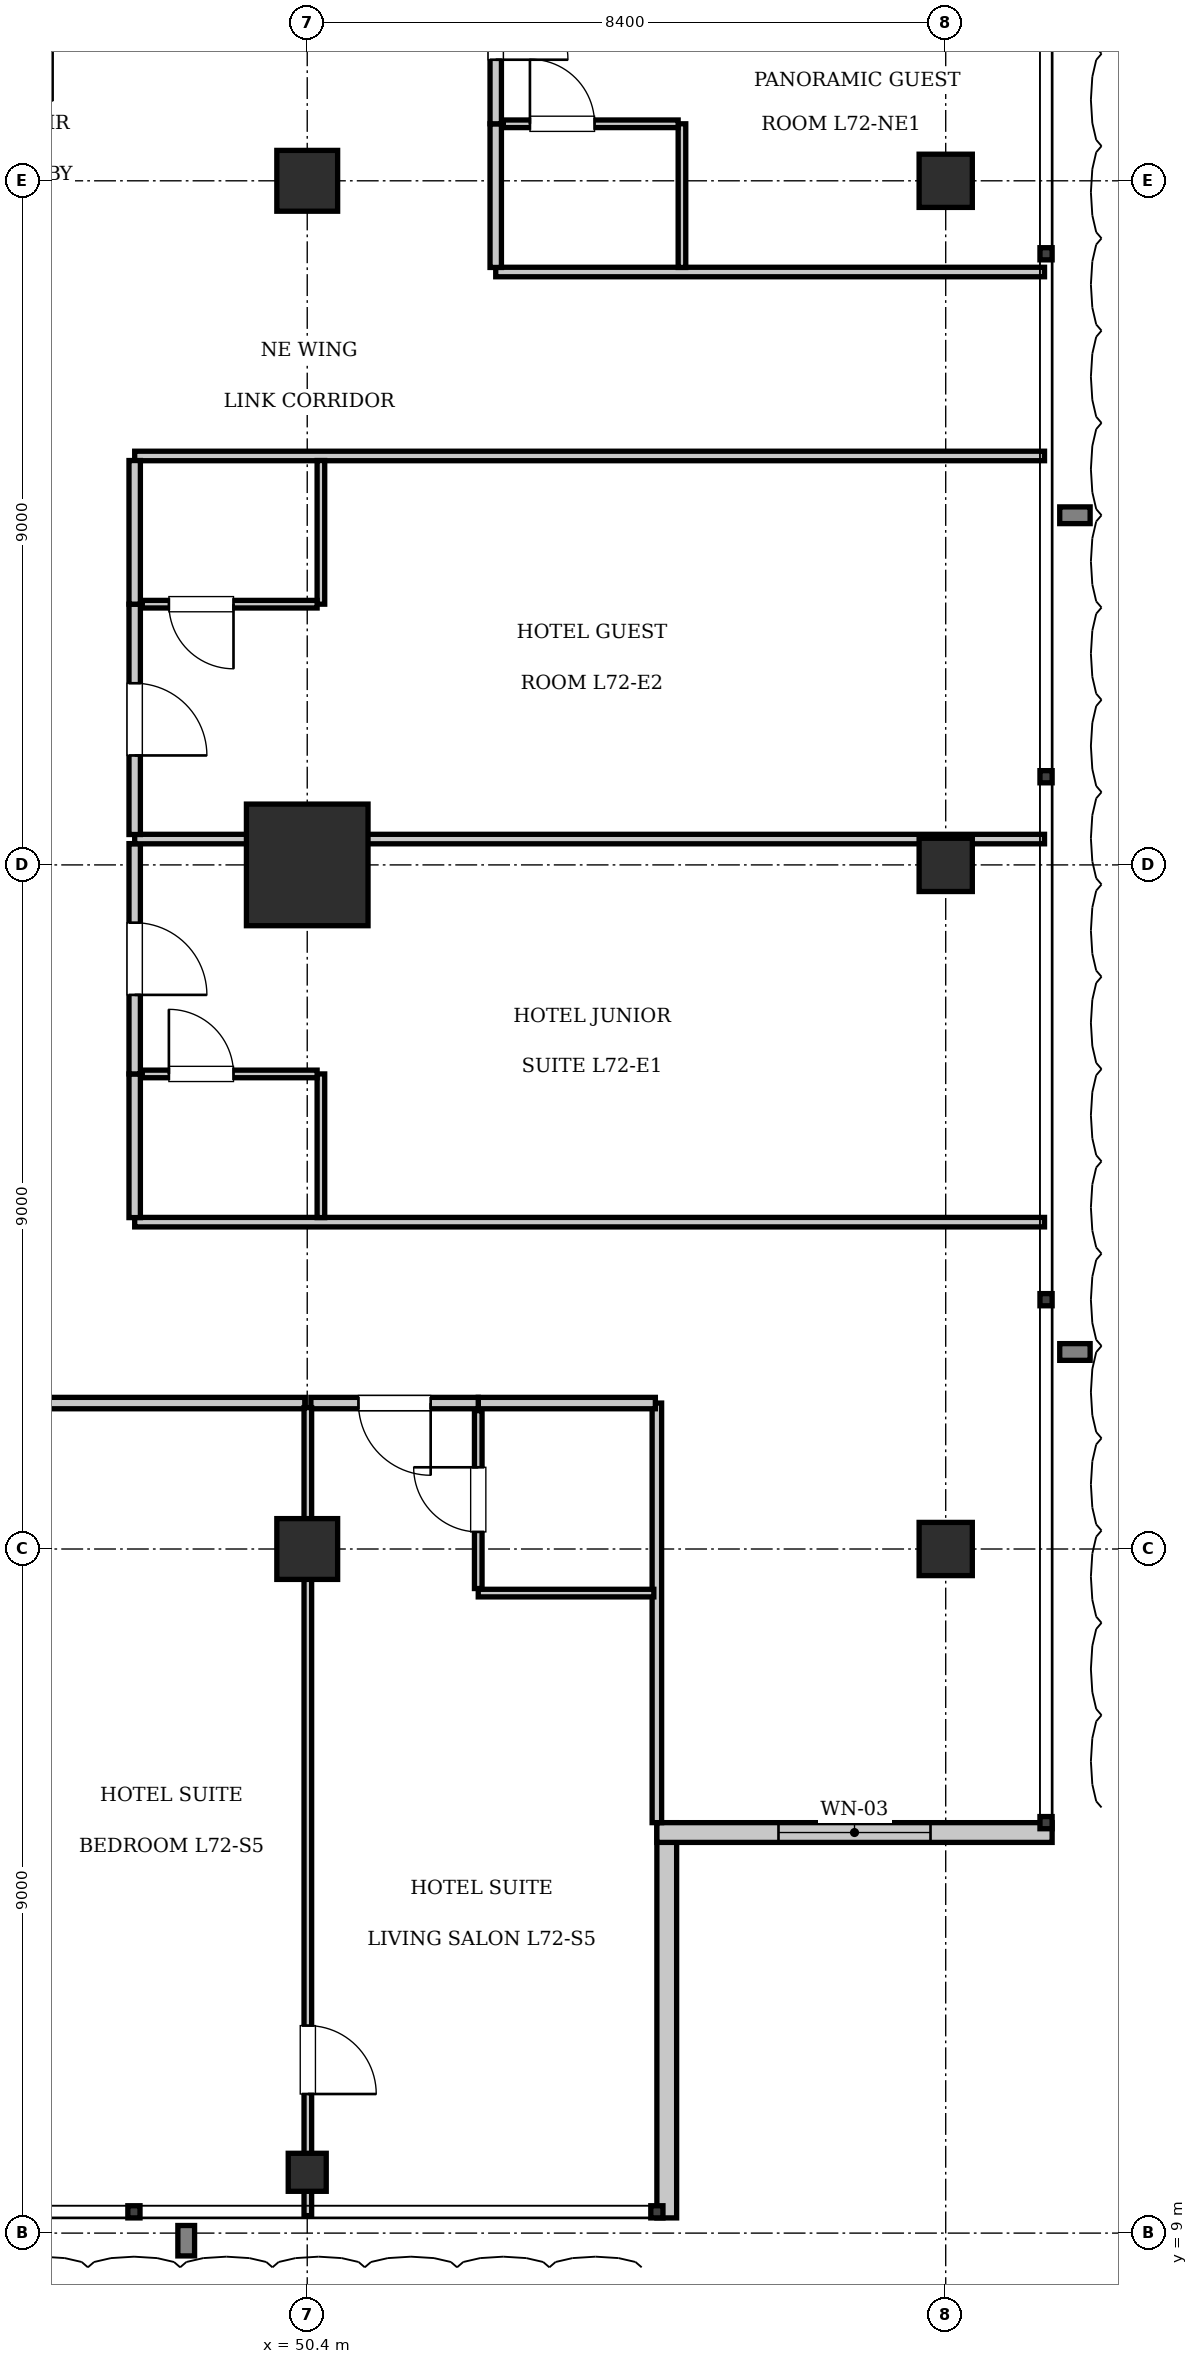
"""IFC4 building model, lengths in metres.
Left out: names, types, materials, properties, quantities, classifications, styles, units other than length and angle.
Written with IfcOpenShell. Run it as: python <this file> out.ifc"""

import sys

from ifc_helpers import new_model, si_unit, direction, frame, frame_2d, origin, origin_2d, place, context, subcontext, project, spatial, rectangle, i_section, extrude, element, fill, save


model = new_model("IFC4")
c1 = context("Model", 3, precision=1e-05, world=origin(), true_north=direction((0.0, 1.0)))
c2 = subcontext(c1, "Body", "Model", "MODEL_VIEW")
j1 = project(units=[si_unit("LENGTHUNIT", "METRE"), si_unit("PLANEANGLEUNIT", "RADIAN")], contexts=[c1])
p1 = place(None, origin())
s1 = spatial("IfcSite", under=j1, at=p1, CompositionType="ELEMENT")
p2 = place(p1, origin())
s2 = spatial("IfcBuilding", under=s1, at=p2, CompositionType="ELEMENT")
p3 = place(p2, frame((0.0, 0.0, 293.3)))
s3 = spatial("IfcBuildingStorey", under=s2, at=p3, CompositionType="ELEMENT", Elevation=293.3)
p4 = place(p3, frame((50.4, 27.0, 0.0), z_axis=(0.0, 0.0, 1.0), x_axis=(1.0, 0.0, 0.0)))
e1 = element("IfcColumn", 1, at=p4, inside=s3, PredefinedType="COLUMN", context=c2, shape_type="SweptSolid", body=[
    extrude(rectangle(XDim=1.6, YDim=1.6, at=origin_2d()), origin(), (0.0, 0.0, 1.0), 3.85),
])
for number, where, z_axis, x_axis in (
    (2, (50.4, 36.0, 0.0), (0.0, 0.0, 1.0), (1.0, 0.0, 0.0)),
    (3, (50.4, 18.0, 0.0), (0.0, 0.0, 1.0), (1.0, 0.0, 0.0)),
):
    element("IfcColumn", number, at=place(p3, frame(where, z_axis=z_axis, x_axis=x_axis)), inside=s3, PredefinedType="COLUMN", context=c2, shape_type="SweptSolid", body=[
        extrude(rectangle(XDim=0.8, YDim=0.8, at=origin_2d()), origin(), (0.0, 0.0, 1.0), 3.85),
    ])
for number, where, z_axis, x_axis in (
    (4, (58.8, 18.0, 0.0), (0.0, 0.0, 1.0), (1.0, 0.0, 0.0)),
    (5, (58.8, 27.0, 0.0), (0.0, 0.0, 1.0), (1.0, 0.0, 0.0)),
    (6, (58.8, 36.0, 0.0), (0.0, 0.0, 1.0), (1.0, 0.0, 0.0)),
):
    element("IfcColumn", number, at=place(p3, frame(where, z_axis=z_axis, x_axis=x_axis)), inside=s3, PredefinedType="COLUMN", context=c2, shape_type="SweptSolid", body=[
        extrude(rectangle(XDim=0.7, YDim=0.7, at=origin_2d()), origin(), (0.0, 0.0, 1.0), 3.85),
    ])
p5 = place(p3, frame((50.4, 9.8, 0.0), z_axis=(0.0, 0.0, 1.0), x_axis=(1.0, 0.0, 0.0)))
e7 = element("IfcColumn", 7, at=p5, inside=s3, PredefinedType="COLUMN", context=c2, shape_type="SweptSolid", body=[
    extrude(i_section(OverallWidth=0.5, OverallDepth=0.5, WebThickness=0.022, FlangeThickness=0.032, at=origin_2d()), origin(), (0.0, 0.0, 1.0), 3.85),
])
p6 = place(p3, frame((55.13, 14.4, 0.0), z_axis=(0.0, 0.0, 1.0), x_axis=(0.0, -1.0, 0.0)))
e8 = element("IfcWall", 8, at=p6, inside=s3, PredefinedType="SOLIDWALL", context=c2, shape_type="SweptSolid", body=[
    extrude(rectangle(XDim=5.2, YDim=0.26, at=frame_2d((2.6, 0.0))), origin(), (0.0, 0.0, 1.0), 3.61),
])
p7 = place(p3, frame((60.2, 14.27, 0.0), z_axis=(0.0, 0.0, 1.0), x_axis=(-1.0, 0.0, 0.0)))
e9 = element("IfcWall", 9, at=p7, inside=s3, PredefinedType="SOLIDWALL", context=c2, shape_type="SweptSolid", body=[
    extrude(rectangle(XDim=5.2, YDim=0.26, at=frame_2d((2.6, 0.0))), origin(), (0.0, 0.0, 1.0), 3.61),
])
p8 = place(p7, frame((1.6, 0.0, 0.9)))
e10 = element("IfcOpeningElement", 10, at=p8, cuts=e9, PredefinedType="OPENING", context=c2, shape_type="SweptSolid", body=[
    extrude(rectangle(XDim=2.0, YDim=2.2, at=frame_2d((1.0, 1.1))), frame((0.0, 0.14, 0.0), z_axis=(0.0, -1.0, 0.0), x_axis=(1.0, 0.0, 0.0)), (0.0, 0.0, 1.0), 0.28),
])
p9 = place(p3, frame((55.0, 14.4, 0.0), z_axis=(0.0, 0.0, 1.0), x_axis=(0.0, 1.0, 0.0)))
e11 = element("IfcWall", 11, at=p9, inside=s3, PredefinedType="PARTITIONING", context=c2, shape_type="SweptSolid", body=[
    extrude(rectangle(XDim=5.52, YDim=0.125, at=frame_2d((2.76, 0.0))), origin(), (0.0, 0.0, 1.0), 3.61),
])
p10 = place(p3, frame((52.65, 19.92, 0.0), z_axis=(0.0, 0.0, 1.0), x_axis=(1.0, 0.0, 0.0)))
e12 = element("IfcWall", 12, at=p10, inside=s3, PredefinedType="PARTITIONING", context=c2, shape_type="SweptSolid", body=[
    extrude(rectangle(XDim=2.33, YDim=0.15, at=frame_2d((1.165, 0.0))), origin(), (0.0, 0.0, 1.0), 3.61),
])
p11 = place(p3, frame((52.65, 17.42, 0.0), z_axis=(0.0, 0.0, 1.0), x_axis=(1.0, 0.0, 0.0)))
e13 = element("IfcWall", 13, at=p11, inside=s3, PredefinedType="PARTITIONING", context=c2, shape_type="SweptSolid", body=[
    extrude(rectangle(XDim=2.31, YDim=0.1, at=frame_2d((1.155, 0.0))), origin(), (0.0, 0.0, 1.0), 3.61),
])
p12 = place(p3, frame((52.65, 17.48, 0.0), z_axis=(0.0, 0.0, 1.0), x_axis=(0.0, 1.0, 0.0)))
e14 = element("IfcWall", 14, at=p12, inside=s3, PredefinedType="PARTITIONING", context=c2, shape_type="SweptSolid", body=[
    extrude(rectangle(XDim=2.34, YDim=0.1, at=frame_2d((1.17, 0.0))), origin(), (0.0, 0.0, 1.0), 3.61),
])
p13 = place(p12, frame((0.745, 0.0, 0.0)))
e15 = element("IfcOpeningElement", 15, at=p13, cuts=e14, PredefinedType="OPENING", context=c2, shape_type="SweptSolid", body=[
    extrude(rectangle(XDim=0.85, YDim=2.1, at=frame_2d((0.425, 1.05))), frame((0.0, 0.06, 0.0), z_axis=(0.0, -1.0, 0.0), x_axis=(1.0, 0.0, 0.0)), (0.0, 0.0, 1.0), 0.12),
])
p14 = place(p3, frame((46.82, 19.92, 0.0), z_axis=(0.0, 0.0, 1.0), x_axis=(1.0, 0.0, 0.0)))
e16 = element("IfcWall", 16, at=p14, inside=s3, PredefinedType="PARTITIONING", context=c2, shape_type="SweptSolid", body=[
    extrude(rectangle(XDim=3.548, YDim=0.15, at=frame_2d((1.774, 0.0))), origin(), (0.0, 0.0, 1.0), 3.61),
])
p15 = place(p3, frame((50.448, 19.92, 0.0), z_axis=(0.0, 0.0, 1.0), x_axis=(1.0, 0.0, 0.0)))
e17 = element("IfcWall", 17, at=p15, inside=s3, PredefinedType="PARTITIONING", context=c2, shape_type="SweptSolid", body=[
    extrude(rectangle(XDim=2.202, YDim=0.15, at=frame_2d((1.101, 0.0))), origin(), (0.0, 0.0, 1.0), 3.61),
])
p16 = place(p15, frame((0.626, 0.0, 0.0)))
e18 = element("IfcOpeningElement", 18, at=p16, cuts=e17, PredefinedType="OPENING", context=c2, shape_type="SweptSolid", body=[
    extrude(rectangle(XDim=0.95, YDim=2.15, at=frame_2d((0.475, 1.075))), frame((0.0, 0.085, 0.0), z_axis=(0.0, -1.0, 0.0), x_axis=(1.0, 0.0, 0.0)), (0.0, 0.0, 1.0), 0.17),
])
p17 = place(p3, frame((50.408, 9.23, 0.0), z_axis=(0.0, 0.0, 1.0), x_axis=(0.0, 1.0, 0.0)))
e19 = element("IfcWall", 19, at=p17, inside=s3, PredefinedType="PARTITIONING", context=c2, shape_type="SweptSolid", body=[
    extrude(rectangle(XDim=10.63, YDim=0.1, at=frame_2d((5.315, 0.0))), origin(), (0.0, 0.0, 1.0), 3.081),
])
p18 = place(p17, frame((1.6, 0.0, 0.0)))
e20 = element("IfcOpeningElement", 20, at=p18, cuts=e19, PredefinedType="OPENING", context=c2, shape_type="SweptSolid", body=[
    extrude(rectangle(XDim=0.9, YDim=2.1, at=frame_2d((0.45, 1.05))), frame((0.0, 0.06, 0.0), z_axis=(0.0, -1.0, 0.0), x_axis=(1.0, 0.0, 0.0)), (0.0, 0.0, 1.0), 0.12),
])
for number, where, z_axis, x_axis in (
    (21, (48.13, 22.3, 0.0), (0.0, 0.0, 1.0), (1.0, 0.0, 0.0)),
    (22, (48.13, 32.38, 0.0), (0.0, 0.0, 1.0), (1.0, 0.0, 0.0)),
):
    element("IfcWall", number, at=place(p3, frame(where, z_axis=z_axis, x_axis=x_axis)), inside=s3, PredefinedType="PARTITIONING", context=c2, shape_type="SweptSolid", body=[
        extrude(rectangle(XDim=11.97, YDim=0.125, at=frame_2d((5.985, 0.0))), origin(), (0.0, 0.0, 1.0), 3.61),
    ])
p19 = place(p3, frame((48.13, 22.36, 0.0), z_axis=(0.0, 0.0, 1.0), x_axis=(0.0, 1.0, 0.0)))
e23 = element("IfcWall", 23, at=p19, inside=s3, PredefinedType="PARTITIONING", context=c2, shape_type="SweptSolid", body=[
    extrude(rectangle(XDim=1.89, YDim=0.15, at=frame_2d((0.945, 0.0))), origin(), (0.0, 0.0, 1.0), 3.61),
])
p20 = place(p3, frame((48.13, 24.25, 0.0), z_axis=(0.0, 0.0, 1.0), x_axis=(0.0, 1.0, 0.0)))
e24 = element("IfcWall", 24, at=p20, inside=s3, PredefinedType="PARTITIONING", context=c2, shape_type="SweptSolid", body=[
    extrude(rectangle(XDim=3.03, YDim=0.15, at=frame_2d((1.515, 0.0))), origin(), (0.0, 0.0, 1.0), 3.61),
])
p21 = place(p20, frame((1.04, 0.0, 0.0)))
e25 = element("IfcOpeningElement", 25, at=p21, cuts=e24, PredefinedType="OPENING", context=c2, shape_type="SweptSolid", body=[
    extrude(rectangle(XDim=0.95, YDim=2.15, at=frame_2d((0.475, 1.075))), frame((0.0, 0.085, 0.0), z_axis=(0.0, -1.0, 0.0), x_axis=(1.0, 0.0, 0.0)), (0.0, 0.0, 1.0), 0.17),
])
p22 = place(p3, frame((50.58, 22.36, 0.0), z_axis=(0.0, 0.0, 1.0), x_axis=(0.0, 1.0, 0.0)))
e26 = element("IfcWall", 26, at=p22, inside=s3, PredefinedType="PARTITIONING", context=c2, shape_type="SweptSolid", body=[
    extrude(rectangle(XDim=1.89, YDim=0.1, at=frame_2d((0.945, 0.0))), origin(), (0.0, 0.0, 1.0), 3.61),
])
p23 = place(p3, frame((48.23, 24.25, 0.0), z_axis=(0.0, 0.0, 1.0), x_axis=(1.0, 0.0, 0.0)))
e27 = element("IfcWall", 27, at=p23, inside=s3, PredefinedType="PARTITIONING", context=c2, shape_type="SweptSolid", body=[
    extrude(rectangle(XDim=2.3, YDim=0.1, at=frame_2d((1.15, 0.0))), origin(), (0.0, 0.0, 1.0), 3.61),
])
p24 = place(p23, frame((0.35, 0.0, 0.0)))
e28 = element("IfcOpeningElement", 28, at=p24, cuts=e27, PredefinedType="OPENING", context=c2, shape_type="SweptSolid", body=[
    extrude(rectangle(XDim=0.85, YDim=2.1, at=frame_2d((0.425, 1.05))), frame((0.0, 0.06, 0.0), z_axis=(0.0, -1.0, 0.0), x_axis=(1.0, 0.0, 0.0)), (0.0, 0.0, 1.0), 0.12),
])
p25 = place(p3, frame((48.13, 27.34, 0.0), z_axis=(0.0, 0.0, 1.0), x_axis=(1.0, 0.0, 0.0)))
e29 = element("IfcWall", 29, at=p25, inside=s3, PredefinedType="PARTITIONING", context=c2, shape_type="SweptSolid", body=[
    extrude(rectangle(XDim=11.97, YDim=0.125, at=frame_2d((5.985, 0.0))), origin(), (0.0, 0.0, 1.0), 3.61),
])
p26 = place(p3, frame((48.13, 27.4, 0.0), z_axis=(0.0, 0.0, 1.0), x_axis=(0.0, 1.0, 0.0)))
e30 = element("IfcWall", 30, at=p26, inside=s3, PredefinedType="PARTITIONING", context=c2, shape_type="SweptSolid", body=[
    extrude(rectangle(XDim=3.03, YDim=0.15, at=frame_2d((1.515, 0.0))), origin(), (0.0, 0.0, 1.0), 3.61),
])
p27 = place(p26, frame((1.04, 0.0, 0.0)))
e31 = element("IfcOpeningElement", 31, at=p27, cuts=e30, PredefinedType="OPENING", context=c2, shape_type="SweptSolid", body=[
    extrude(rectangle(XDim=0.95, YDim=2.15, at=frame_2d((0.475, 1.075))), frame((0.0, 0.085, 0.0), z_axis=(0.0, -1.0, 0.0), x_axis=(1.0, 0.0, 0.0)), (0.0, 0.0, 1.0), 0.17),
])
p28 = place(p3, frame((48.13, 30.43, 0.0), z_axis=(0.0, 0.0, 1.0), x_axis=(0.0, 1.0, 0.0)))
e32 = element("IfcWall", 32, at=p28, inside=s3, PredefinedType="PARTITIONING", context=c2, shape_type="SweptSolid", body=[
    extrude(rectangle(XDim=1.89, YDim=0.15, at=frame_2d((0.945, 0.0))), origin(), (0.0, 0.0, 1.0), 3.61),
])
p29 = place(p3, frame((50.58, 30.43, 0.0), z_axis=(0.0, 0.0, 1.0), x_axis=(0.0, 1.0, 0.0)))
e33 = element("IfcWall", 33, at=p29, inside=s3, PredefinedType="PARTITIONING", context=c2, shape_type="SweptSolid", body=[
    extrude(rectangle(XDim=1.89, YDim=0.1, at=frame_2d((0.945, 0.0))), origin(), (0.0, 0.0, 1.0), 3.61),
])
p30 = place(p3, frame((48.23, 30.43, 0.0), z_axis=(0.0, 0.0, 1.0), x_axis=(1.0, 0.0, 0.0)))
e34 = element("IfcWall", 34, at=p30, inside=s3, PredefinedType="PARTITIONING", context=c2, shape_type="SweptSolid", body=[
    extrude(rectangle(XDim=2.3, YDim=0.1, at=frame_2d((1.15, 0.0))), origin(), (0.0, 0.0, 1.0), 3.61),
])
p31 = place(p30, frame((0.35, 0.0, 0.0)))
e35 = element("IfcOpeningElement", 35, at=p31, cuts=e34, PredefinedType="OPENING", context=c2, shape_type="SweptSolid", body=[
    extrude(rectangle(XDim=0.85, YDim=2.1, at=frame_2d((0.425, 1.05))), frame((0.0, 0.06, 0.0), z_axis=(0.0, -1.0, 0.0), x_axis=(1.0, 0.0, 0.0)), (0.0, 0.0, 1.0), 0.12),
])
p32 = place(p3, frame((52.88, 34.8, 0.0), z_axis=(0.0, 0.0, 1.0), x_axis=(1.0, 0.0, 0.0)))
e36 = element("IfcWall", 36, at=p32, inside=s3, PredefinedType="PARTITIONING", context=c2, shape_type="SweptSolid", body=[
    extrude(rectangle(XDim=7.22, YDim=0.125, at=frame_2d((3.61, 0.0))), origin(), (0.0, 0.0, 1.0), 3.61),
])
p33 = place(p3, frame((52.88, 34.86, 0.0), z_axis=(0.0, 0.0, 1.0), x_axis=(0.0, 1.0, 0.0)))
e37 = element("IfcWall", 37, at=p33, inside=s3, PredefinedType="PARTITIONING", context=c2, shape_type="SweptSolid", body=[
    extrude(rectangle(XDim=1.89, YDim=0.15, at=frame_2d((0.945, 0.0))), origin(), (0.0, 0.0, 1.0), 3.61),
])
p34 = place(p3, frame((52.88, 36.75, 0.0), z_axis=(0.0, 0.0, 1.0), x_axis=(0.0, 1.0, 0.0)))
e38 = element("IfcWall", 38, at=p34, inside=s3, PredefinedType="PARTITIONING", context=c2, shape_type="SweptSolid", body=[
    extrude(rectangle(XDim=2.636, YDim=0.15, at=frame_2d((1.318, 0.0))), origin(), (0.0, 0.0, 1.0), 3.61),
])
p35 = place(p34, frame((0.843, 0.0, 0.0)))
e39 = element("IfcOpeningElement", 39, at=p35, cuts=e38, PredefinedType="OPENING", context=c2, shape_type="SweptSolid", body=[
    extrude(rectangle(XDim=0.95, YDim=2.15, at=frame_2d((0.475, 1.075))), frame((0.0, 0.085, 0.0), z_axis=(0.0, -1.0, 0.0), x_axis=(1.0, 0.0, 0.0)), (0.0, 0.0, 1.0), 0.17),
])
p36 = place(p3, frame((55.33, 34.86, 0.0), z_axis=(0.0, 0.0, 1.0), x_axis=(0.0, 1.0, 0.0)))
e40 = element("IfcWall", 40, at=p36, inside=s3, PredefinedType="PARTITIONING", context=c2, shape_type="SweptSolid", body=[
    extrude(rectangle(XDim=1.89, YDim=0.1, at=frame_2d((0.945, 0.0))), origin(), (0.0, 0.0, 1.0), 3.61),
])
p37 = place(p3, frame((52.98, 36.75, 0.0), z_axis=(0.0, 0.0, 1.0), x_axis=(1.0, 0.0, 0.0)))
e41 = element("IfcWall", 41, at=p37, inside=s3, PredefinedType="PARTITIONING", context=c2, shape_type="SweptSolid", body=[
    extrude(rectangle(XDim=2.3, YDim=0.1, at=frame_2d((1.15, 0.0))), origin(), (0.0, 0.0, 1.0), 3.61),
])
p38 = place(p37, frame((0.35, 0.0, 0.0)))
e42 = element("IfcOpeningElement", 42, at=p38, cuts=e41, PredefinedType="OPENING", context=c2, shape_type="SweptSolid", body=[
    extrude(rectangle(XDim=0.85, YDim=2.1, at=frame_2d((0.425, 1.05))), frame((0.0, 0.06, 0.0), z_axis=(0.0, -1.0, 0.0), x_axis=(1.0, 0.0, 0.0)), (0.0, 0.0, 1.0), 0.12),
])
p39 = place(p8, origin())
e43 = element("IfcWindow", 43, at=p39, inside=s3, PartitioningType="SINGLE_PANEL", PredefinedType="WINDOW", context=c2, shape_type="SweptSolid", body=[
    extrude(rectangle(XDim=2.0, YDim=2.2, at=frame_2d((1.0, 1.1))), frame((0.0, 0.03, 0.0), z_axis=(0.0, -1.0, 0.0), x_axis=(1.0, 0.0, 0.0)), (0.0, 0.0, 1.0), 0.06),
])
fill(e10, e43)
p40 = place(p13, origin())
e44 = element("IfcDoor", 44, at=p40, inside=s3, OperationType="SINGLE_SWING_RIGHT", PredefinedType="DOOR", context=c2, shape_type="SweptSolid", body=[
    extrude(rectangle(XDim=0.85, YDim=2.1, at=frame_2d((0.425, 1.05))), frame((0.0, 0.025, 0.0), z_axis=(0.0, -1.0, 0.0), x_axis=(1.0, 0.0, 0.0)), (0.0, 0.0, 1.0), 0.05),
])
fill(e15, e44)
p41 = place(p16, frame((0.95, 0.0, 0.0), z_axis=(0.0, 0.0, 1.0), x_axis=(-1.0, 0.0, 0.0)))
e45 = element("IfcDoor", 45, at=p41, inside=s3, OperationType="SINGLE_SWING_LEFT", PredefinedType="DOOR", context=c2, shape_type="SweptSolid", body=[
    extrude(rectangle(XDim=0.95, YDim=2.15, at=frame_2d((0.475, 1.075))), frame((0.0, 0.025, 0.0), z_axis=(0.0, -1.0, 0.0), x_axis=(1.0, 0.0, 0.0)), (0.0, 0.0, 1.0), 0.05),
])
fill(e18, e45)
p42 = place(p18, frame((0.9, 0.0, 0.0), z_axis=(0.0, 0.0, 1.0), x_axis=(-1.0, 0.0, 0.0)))
e46 = element("IfcDoor", 46, at=p42, inside=s3, OperationType="SINGLE_SWING_RIGHT", PredefinedType="DOOR", context=c2, shape_type="SweptSolid", body=[
    extrude(rectangle(XDim=0.9, YDim=2.1, at=frame_2d((0.45, 1.05))), frame((0.0, 0.025, 0.0), z_axis=(0.0, -1.0, 0.0), x_axis=(1.0, 0.0, 0.0)), (0.0, 0.0, 1.0), 0.05),
])
fill(e20, e46)
p43 = place(p24, origin())
e47 = element("IfcDoor", 47, at=p43, inside=s3, OperationType="SINGLE_SWING_LEFT", PredefinedType="DOOR", context=c2, shape_type="SweptSolid", body=[
    extrude(rectangle(XDim=0.85, YDim=2.1, at=frame_2d((0.425, 1.05))), frame((0.0, 0.025, 0.0), z_axis=(0.0, -1.0, 0.0), x_axis=(1.0, 0.0, 0.0)), (0.0, 0.0, 1.0), 0.05),
])
fill(e28, e47)
p44 = place(p21, frame((0.95, 0.0, 0.0), z_axis=(0.0, 0.0, 1.0), x_axis=(-1.0, 0.0, 0.0)))
e48 = element("IfcDoor", 48, at=p44, inside=s3, OperationType="SINGLE_SWING_RIGHT", PredefinedType="DOOR", context=c2, shape_type="SweptSolid", body=[
    extrude(rectangle(XDim=0.95, YDim=2.15, at=frame_2d((0.475, 1.075))), frame((0.0, 0.025, 0.0), z_axis=(0.0, -1.0, 0.0), x_axis=(1.0, 0.0, 0.0)), (0.0, 0.0, 1.0), 0.05),
])
fill(e25, e48)
p45 = place(p31, frame((0.85, 0.0, 0.0), z_axis=(0.0, 0.0, 1.0), x_axis=(-1.0, 0.0, 0.0)))
e49 = element("IfcDoor", 49, at=p45, inside=s3, OperationType="SINGLE_SWING_LEFT", PredefinedType="DOOR", context=c2, shape_type="SweptSolid", body=[
    extrude(rectangle(XDim=0.85, YDim=2.1, at=frame_2d((0.425, 1.05))), frame((0.0, 0.025, 0.0), z_axis=(0.0, -1.0, 0.0), x_axis=(1.0, 0.0, 0.0)), (0.0, 0.0, 1.0), 0.05),
])
fill(e35, e49)
p46 = place(p27, frame((0.95, 0.0, 0.0), z_axis=(0.0, 0.0, 1.0), x_axis=(-1.0, 0.0, 0.0)))
e50 = element("IfcDoor", 50, at=p46, inside=s3, OperationType="SINGLE_SWING_RIGHT", PredefinedType="DOOR", context=c2, shape_type="SweptSolid", body=[
    extrude(rectangle(XDim=0.95, YDim=2.15, at=frame_2d((0.475, 1.075))), frame((0.0, 0.025, 0.0), z_axis=(0.0, -1.0, 0.0), x_axis=(1.0, 0.0, 0.0)), (0.0, 0.0, 1.0), 0.05),
])
fill(e31, e50)
p47 = place(p38, origin())
e51 = element("IfcDoor", 51, at=p47, inside=s3, OperationType="SINGLE_SWING_LEFT", PredefinedType="DOOR", context=c2, shape_type="SweptSolid", body=[
    extrude(rectangle(XDim=0.85, YDim=2.1, at=frame_2d((0.425, 1.05))), frame((0.0, 0.025, 0.0), z_axis=(0.0, -1.0, 0.0), x_axis=(1.0, 0.0, 0.0)), (0.0, 0.0, 1.0), 0.05),
])
fill(e42, e51)
p48 = place(p35, frame((0.95, 0.0, 0.0), z_axis=(0.0, 0.0, 1.0), x_axis=(-1.0, 0.0, 0.0)))
e52 = element("IfcDoor", 52, at=p48, inside=s3, OperationType="SINGLE_SWING_RIGHT", PredefinedType="DOOR", context=c2, shape_type="SweptSolid", body=[
    extrude(rectangle(XDim=0.95, YDim=2.15, at=frame_2d((0.475, 1.075))), frame((0.0, 0.025, 0.0), z_axis=(0.0, -1.0, 0.0), x_axis=(1.0, 0.0, 0.0)), (0.0, 0.0, 1.0), 0.05),
])
fill(e39, e52)
save(model, sys.argv[1])
